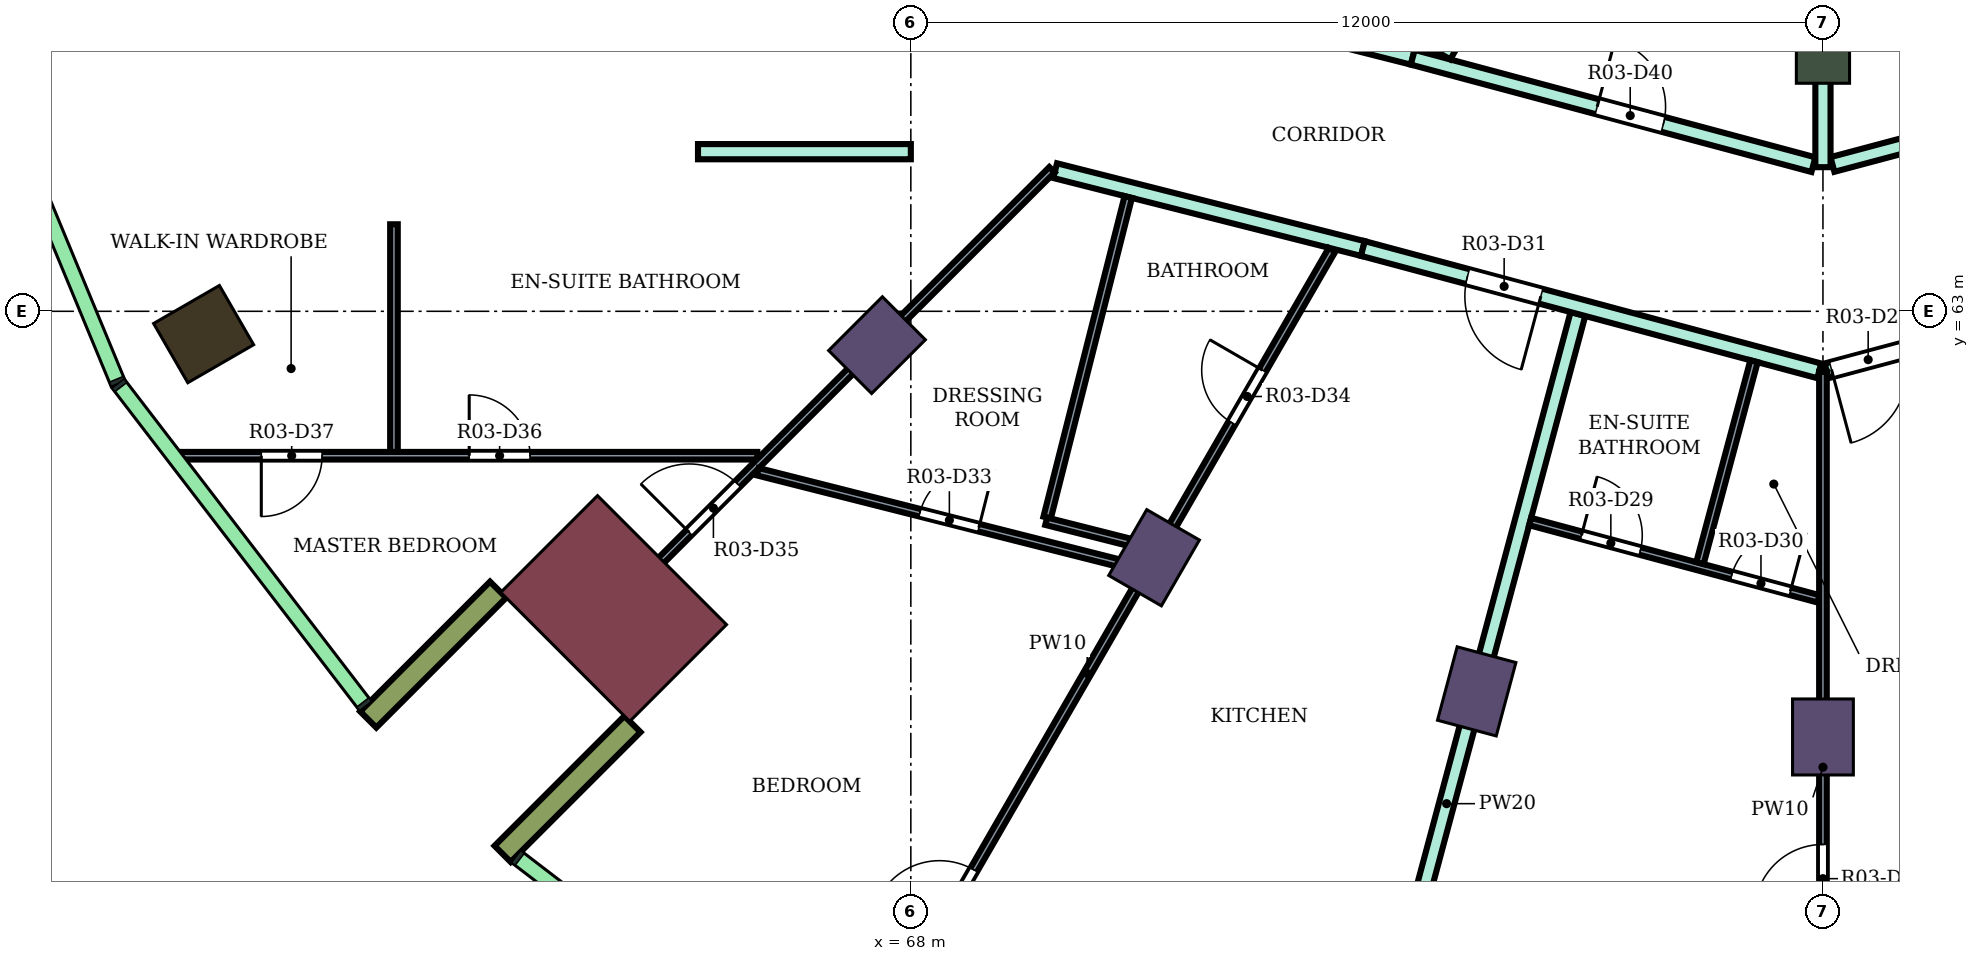
"""IFC4 building model, lengths in metres.
Left out: names, types, materials, properties, quantities, classifications, styles, units other than length and angle.
Written with IfcOpenShell. Run it as: python <this file> out.ifc"""

import sys

from ifc_helpers import new_model, si_unit, direction, frame, frame_2d, origin, origin_2d, place, context, subcontext, project, spatial, rectangle, extrude, element, fill, save


model = new_model("IFC4")
c1 = context("Model", 3, precision=1e-05, world=origin(), true_north=direction((0.0, 1.0)))
c2 = subcontext(c1, "Body", "Model", "MODEL_VIEW")
j1 = project(units=[si_unit("LENGTHUNIT", "METRE"), si_unit("PLANEANGLEUNIT", "RADIAN")], contexts=[c1])
p1 = place(None, origin())
s1 = spatial("IfcSite", under=j1, at=p1, CompositionType="ELEMENT")
p2 = place(p1, origin())
s2 = spatial("IfcBuilding", under=s1, at=p2, CompositionType="ELEMENT")
p3 = place(p2, frame((0.0, 0.0, 186.4)))
s3 = spatial("IfcBuildingStorey", under=s2, at=p3, CompositionType="ELEMENT", Elevation=186.4)
p4 = place(p3, frame((58.696, 62.7, 0.0), z_axis=(0.0, 0.0, 1.0), x_axis=(-0.866025403784, -0.5, 0.0)))
e1 = element("IfcColumn", 1, at=p4, inside=s3, PredefinedType="COLUMN", context=c2, shape_type="SweptSolid", body=[
    extrude(rectangle(XDim=1.0, YDim=0.9, at=origin_2d()), origin(), (0.0, 0.0, 1.0), 4.1),
])
for number, where, z_axis, x_axis in (
    (2, (67.555, 62.555, 0.0), (0.0, 0.0, 1.0), (-0.707, -0.707, 0.0)),
    (3, (71.2, 59.758, 0.0), (0.0, 0.0, 1.0), (-0.5, -0.866, 0.0)),
    (4, (75.445, 58.0, 0.0), (0.0, 0.0, 1.0), (-0.259, -0.966, 0.0)),
    (5, (80.0, 57.4, 0.0), (0.0, 0.0, 1.0), (0.0, -1.0, 0.0)),
):
    element("IfcColumn", number, at=place(p3, frame(where, z_axis=z_axis, x_axis=x_axis)), inside=s3, PredefinedType="COLUMN", context=c2, shape_type="SweptSolid", body=[
        extrude(rectangle(XDim=1.0, YDim=0.8, at=origin_2d()), origin(), (0.0, 0.0, 1.0), 4.1),
    ])
p5 = place(p3, frame((80.0, 66.4, 0.0), z_axis=(0.0, 0.0, 1.0), x_axis=(0.0, -1.0, 0.0)))
e6 = element("IfcColumn", 6, at=p5, inside=s3, PredefinedType="COLUMN", context=c2, shape_type="SweptSolid", body=[
    extrude(rectangle(XDim=0.8, YDim=0.7, at=origin_2d()), origin(), (0.0, 0.0, 1.0), 4.1),
])
p6 = place(p3, frame((64.09, 59.09, 0.0), z_axis=(0.0, 0.0, 1.0), x_axis=(-0.707106781187, -0.707106781187, 0.0)))
e7 = element("IfcColumn", 7, at=p6, inside=s3, PredefinedType="COLUMN", context=c2, shape_type="SweptSolid", body=[
    extrude(rectangle(XDim=1.8, YDim=2.4, at=origin_2d()), origin(), (0.0, 0.0, 1.0), 4.1),
])
for number, where, z_axis, x_axis in (
    (8, (62.57, 59.338, 0.0), (0.0, 0.0, 1.0), (-0.707, -0.707, 0.0)),
    (9, (64.338, 57.57, 0.0), (0.0, 0.0, 1.0), (-0.707, -0.707, 0.0)),
):
    element("IfcWall", number, at=place(p3, frame(where, z_axis=z_axis, x_axis=x_axis)), inside=s3, PredefinedType="NOTDEFINED", context=c2, shape_type="SweptSolid", body=[
        extrude(rectangle(XDim=2.416, YDim=0.3, at=frame_2d((1.208, 0.0))), origin(), (0.0, 0.0, 1.0), 4.1),
    ])
p7 = place(p3, frame((65.2, 65.1, 0.0), z_axis=(0.0, 0.0, 1.0), x_axis=(1.0, 0.0, 0.0)))
e10 = element("IfcWall", 10, at=p7, inside=s3, PredefinedType="PARTITIONING", context=c2, shape_type="SweptSolid", body=[
    extrude(rectangle(XDim=2.8, YDim=0.2, at=frame_2d((1.4, 0.0))), origin(), (0.0, 0.0, 1.0), 3.65),
])
p8 = place(p3, frame((69.899, 64.85, 0.0), z_axis=(0.0, 0.0, 1.0), x_axis=(0.969429930153, -0.245368316057, 0.0)))
e11 = element("IfcWall", 11, at=p8, inside=s3, PredefinedType="PARTITIONING", context=c2, shape_type="SweptSolid", body=[
    extrude(rectangle(XDim=4.176, YDim=0.2, at=frame_2d((2.088, 0.0))), origin(), (0.0, 0.0, 1.0), 3.65),
])
p9 = place(p3, frame((72.1, 66.975, 0.0), z_axis=(0.0, 0.0, 1.0), x_axis=(0.969471314457, -0.245204752086, 0.0)))
e12 = element("IfcWall", 12, at=p9, inside=s3, PredefinedType="PARTITIONING", context=c2, shape_type="SweptSolid", body=[
    extrude(rectangle(XDim=2.582, YDim=0.2, at=frame_2d((1.291, 0.0))), origin(), (0.0, 0.0, 1.0), 3.65),
])
p10 = place(p9, frame((0.841, 0.0, 0.0)))
e13 = element("IfcOpeningElement", 13, at=p10, cuts=e12, PredefinedType="OPENING", context=c2, shape_type="SweptSolid", body=[
    extrude(rectangle(XDim=0.9, YDim=2.1, at=frame_2d((0.45, 1.05))), frame((0.0, 0.11, 0.0), z_axis=(0.0, -1.0, 0.0), x_axis=(1.0, 0.0, 0.0)), (0.0, 0.0, 1.0), 0.22),
])
p11 = place(p3, frame((73.322, 50.081, 0.0), z_axis=(0.0, 0.0, 1.0), x_axis=(0.258965725415, 0.965886511481, 0.0)))
e14 = element("IfcWall", 14, at=p11, inside=s3, PredefinedType="PARTITIONING", context=c2, shape_type="SweptSolid", body=[
    extrude(rectangle(XDim=13.338, YDim=0.2, at=frame_2d((6.669, 0.0))), origin(), (0.0, 0.0, 1.0), 3.65),
])
p12 = place(p3, frame((73.947, 63.826, 0.0), z_axis=(0.0, 0.0, 1.0), x_axis=(0.965898432367, -0.258921258979, 0.0)))
e15 = element("IfcWall", 15, at=p12, inside=s3, PredefinedType="PARTITIONING", context=c2, shape_type="SweptSolid", body=[
    extrude(rectangle(XDim=6.217, YDim=0.2, at=frame_2d((3.108, 0.0))), origin(), (0.0, 0.0, 1.0), 3.65),
])
p13 = place(p12, frame((1.424, 0.0, 0.0)))
e16 = element("IfcOpeningElement", 16, at=p13, cuts=e15, PredefinedType="OPENING", context=c2, shape_type="SweptSolid", body=[
    extrude(rectangle(XDim=1.0, YDim=2.1, at=frame_2d((0.5, 1.05))), frame((0.0, 0.11, 0.0), z_axis=(0.0, -1.0, 0.0), x_axis=(1.0, 0.0, 0.0)), (0.0, 0.0, 1.0), 0.22),
])
p14 = place(p3, frame((74.603, 66.342, 0.0), z_axis=(0.0, 0.0, 1.0), x_axis=(0.965920893652, -0.258837453254, 0.0)))
e17 = element("IfcWall", 17, at=p14, inside=s3, PredefinedType="PARTITIONING", context=c2, shape_type="SweptSolid", body=[
    extrude(rectangle(XDim=5.458, YDim=0.2, at=frame_2d((2.729, 0.0))), origin(), (0.0, 0.0, 1.0), 3.65),
])
p15 = place(p14, frame((2.512, 0.0, 0.0)))
e18 = element("IfcOpeningElement", 18, at=p15, cuts=e17, PredefinedType="OPENING", context=c2, shape_type="SweptSolid", body=[
    extrude(rectangle(XDim=0.9, YDim=2.1, at=frame_2d((0.45, 1.05))), frame((0.0, 0.11, 0.0), z_axis=(0.0, -1.0, 0.0), x_axis=(1.0, 0.0, 0.0)), (0.0, 0.0, 1.0), 0.22),
])
p16 = place(p3, frame((75.01, 66.364, 0.0), z_axis=(0.0, 0.0, 1.0), x_axis=(0.500097042406, 0.865969369075, 0.0)))
e19 = element("IfcWall", 19, at=p16, inside=s3, PredefinedType="PARTITIONING", context=c2, shape_type="SweptSolid", body=[
    extrude(rectangle(XDim=2.275, YDim=0.2, at=frame_2d((1.138, 0.0))), origin(), (0.0, 0.0, 1.0), 3.65),
])
p17 = place(p3, frame((80.125, 64.932, 0.0), z_axis=(0.0, 0.0, 1.0), x_axis=(0.966236955806, 0.257655089674, 0.0)))
e20 = element("IfcWall", 20, at=p17, inside=s3, PredefinedType="PARTITIONING", context=c2, shape_type="SweptSolid", body=[
    extrude(rectangle(XDim=8.039, YDim=0.2, at=frame_2d((4.02, 0.0))), origin(), (0.0, 0.0, 1.0), 3.65),
])
p18 = place(p17, frame((6.298, 0.0, 0.0)))
e21 = element("IfcOpeningElement", 21, at=p18, cuts=e20, PredefinedType="OPENING", context=c2, shape_type="SweptSolid", body=[
    extrude(rectangle(XDim=0.9, YDim=2.1, at=frame_2d((0.45, 1.05))), frame((0.0, 0.11, 0.0), z_axis=(0.0, -1.0, 0.0), x_axis=(1.0, 0.0, 0.0)), (0.0, 0.0, 1.0), 0.22),
])
p19 = place(p17, frame((2.045, 0.0, 0.0)))
e22 = element("IfcOpeningElement", 22, at=p19, cuts=e20, PredefinedType="OPENING", context=c2, shape_type="SweptSolid", body=[
    extrude(rectangle(XDim=0.9, YDim=2.1, at=frame_2d((0.45, 1.05))), frame((0.0, 0.11, 0.0), z_axis=(0.0, -1.0, 0.0), x_axis=(1.0, 0.0, 0.0)), (0.0, 0.0, 1.0), 0.22),
])
p20 = place(p3, frame((80.048, 62.217, 0.0), z_axis=(0.0, 0.0, 1.0), x_axis=(0.965967276872, 0.258664299841, 0.0)))
e23 = element("IfcWall", 23, at=p20, inside=s3, PredefinedType="PARTITIONING", context=c2, shape_type="SweptSolid", body=[
    extrude(rectangle(XDim=6.007, YDim=0.2, at=frame_2d((3.003, 0.0))), origin(), (0.0, 0.0, 1.0), 3.65),
])
p21 = place(p20, frame((0.066, 0.0, 0.0)))
e24 = element("IfcOpeningElement", 24, at=p21, cuts=e23, PredefinedType="OPENING", context=c2, shape_type="SweptSolid", body=[
    extrude(rectangle(XDim=1.0, YDim=2.1, at=frame_2d((0.5, 1.05))), frame((0.0, 0.11, 0.0), z_axis=(0.0, -1.0, 0.0), x_axis=(1.0, 0.0, 0.0)), (0.0, 0.0, 1.0), 0.22),
])
p22 = place(p3, frame((80.0, 64.896, 0.0), z_axis=(0.0, 0.0, 1.0), x_axis=(0.0, 1.0, 0.0)))
e25 = element("IfcWall", 25, at=p22, inside=s3, PredefinedType="PARTITIONING", context=c2, shape_type="SweptSolid", body=[
    extrude(rectangle(XDim=2.405, YDim=0.2, at=frame_2d((1.203, 0.0))), origin(), (0.0, 0.0, 1.0), 3.65),
])
p23 = place(p3, frame((58.379, 61.1, 0.0), z_axis=(0.0, 0.0, 1.0), x_axis=(1.0, 0.0, 0.0)))
e26 = element("IfcWall", 26, at=p23, inside=s3, PredefinedType="PARTITIONING", context=c2, shape_type="SweptSolid", body=[
    extrude(rectangle(XDim=7.601, YDim=0.1, at=frame_2d((3.801, 0.0))), origin(), (0.0, 0.0, 1.0), 3.65),
])
p24 = place(p23, frame((3.811, 0.0, 0.0)))
e27 = element("IfcOpeningElement", 27, at=p24, cuts=e26, PredefinedType="OPENING", context=c2, shape_type="SweptSolid", body=[
    extrude(rectangle(XDim=0.8, YDim=2.1, at=frame_2d((0.4, 1.05))), frame((0.0, 0.06, 0.0), z_axis=(0.0, -1.0, 0.0), x_axis=(1.0, 0.0, 0.0)), (0.0, 0.0, 1.0), 0.12),
])
p25 = place(p23, frame((1.075, 0.0, 0.0)))
e28 = element("IfcOpeningElement", 28, at=p25, cuts=e26, PredefinedType="OPENING", context=c2, shape_type="SweptSolid", body=[
    extrude(rectangle(XDim=0.8, YDim=2.1, at=frame_2d((0.4, 1.05))), frame((0.0, 0.06, 0.0), z_axis=(0.0, -1.0, 0.0), x_axis=(1.0, 0.0, 0.0)), (0.0, 0.0, 1.0), 0.12),
])
p26 = place(p3, frame((61.2, 61.15, 0.0), z_axis=(0.0, 0.0, 1.0), x_axis=(0.0, 1.0, 0.0)))
e29 = element("IfcWall", 29, at=p26, inside=s3, PredefinedType="PARTITIONING", context=c2, shape_type="SweptSolid", body=[
    extrude(rectangle(XDim=2.995, YDim=0.1, at=frame_2d((1.498, 0.0))), origin(), (0.0, 0.0, 1.0), 3.65),
])
p27 = place(p3, frame((63.592, 58.6, 0.0), z_axis=(0.0, 0.0, 1.0), x_axis=(0.707272108928, 0.706941414781, 0.0)))
e30 = element("IfcWall", 30, at=p27, inside=s3, PredefinedType="PARTITIONING", context=c2, shape_type="SweptSolid", body=[
    extrude(rectangle(XDim=8.859, YDim=0.1, at=frame_2d((4.43, 0.0))), origin(), (0.0, 0.0, 1.0), 3.65),
])
p28 = place(p27, frame((2.111, 0.0, 0.0)))
e31 = element("IfcOpeningElement", 31, at=p28, cuts=e30, PredefinedType="OPENING", context=c2, shape_type="SweptSolid", body=[
    extrude(rectangle(XDim=0.9, YDim=2.1, at=frame_2d((0.45, 1.05))), frame((0.0, 0.06, 0.0), z_axis=(0.0, -1.0, 0.0), x_axis=(1.0, 0.0, 0.0)), (0.0, 0.0, 1.0), 0.12),
])
p29 = place(p3, frame((65.987, 60.889, 0.0), z_axis=(0.0, 0.0, 1.0), x_axis=(0.969431303535, -0.245362889871, 0.0)))
e32 = element("IfcWall", 32, at=p29, inside=s3, PredefinedType="PARTITIONING", context=c2, shape_type="SweptSolid", body=[
    extrude(rectangle(XDim=5.22, YDim=0.1, at=frame_2d((2.61, 0.0))), origin(), (0.0, 0.0, 1.0), 3.65),
])
p30 = place(p29, frame((2.2, 0.0, 0.0)))
e33 = element("IfcOpeningElement", 33, at=p30, cuts=e32, PredefinedType="OPENING", context=c2, shape_type="SweptSolid", body=[
    extrude(rectangle(XDim=0.8, YDim=2.1, at=frame_2d((0.4, 1.05))), frame((0.0, 0.06, 0.0), z_axis=(0.0, -1.0, 0.0), x_axis=(1.0, 0.0, 0.0)), (0.0, 0.0, 1.0), 0.12),
])
p31 = place(p3, frame((67.099, 52.66, 0.0), z_axis=(0.0, 0.0, 1.0), x_axis=(0.500286442712, 0.865859962834, 0.0)))
e34 = element("IfcWall", 34, at=p31, inside=s3, PredefinedType="PARTITIONING", context=c2, shape_type="SweptSolid", body=[
    extrude(rectangle(XDim=12.876, YDim=0.1, at=frame_2d((6.438, 0.0))), origin(), (0.0, 0.0, 1.0), 3.65),
])
p32 = place(p31, frame((2.556, 0.0, 0.0)))
e35 = element("IfcOpeningElement", 35, at=p32, cuts=e34, PredefinedType="OPENING", context=c2, shape_type="SweptSolid", body=[
    extrude(rectangle(XDim=0.9, YDim=2.1, at=frame_2d((0.45, 1.05))), frame((0.0, 0.06, 0.0), z_axis=(0.0, -1.0, 0.0), x_axis=(1.0, 0.0, 0.0)), (0.0, 0.0, 1.0), 0.12),
])
p33 = place(p31, frame((10.248, 0.0, 0.0)))
e36 = element("IfcOpeningElement", 36, at=p33, cuts=e34, PredefinedType="OPENING", context=c2, shape_type="SweptSolid", body=[
    extrude(rectangle(XDim=0.8, YDim=2.1, at=frame_2d((0.4, 1.05))), frame((0.0, 0.06, 0.0), z_axis=(0.0, -1.0, 0.0), x_axis=(1.0, 0.0, 0.0)), (0.0, 0.0, 1.0), 0.12),
])
p34 = place(p3, frame((69.793, 60.287, 0.0), z_axis=(0.0, 0.0, 1.0), x_axis=(0.245307703654, 0.969445269486, 0.0)))
e37 = element("IfcWall", 37, at=p34, inside=s3, PredefinedType="PARTITIONING", context=c2, shape_type="SweptSolid", body=[
    extrude(rectangle(XDim=4.35, YDim=0.1, at=frame_2d((2.175, 0.0))), origin(), (0.0, 0.0, 1.0), 3.65),
])
p35 = place(p3, frame((69.781, 60.238, 0.0), z_axis=(0.0, 0.0, 1.0), x_axis=(0.969502558328, -0.245081189397, 0.0)))
e38 = element("IfcWall", 38, at=p35, inside=s3, PredefinedType="PARTITIONING", context=c2, shape_type="SweptSolid", body=[
    extrude(rectangle(XDim=1.466, YDim=0.1, at=frame_2d((0.733, 0.0))), origin(), (0.0, 0.0, 1.0), 3.65),
])
p36 = place(p3, frame((76.147, 60.234, 0.0), z_axis=(0.0, 0.0, 1.0), x_axis=(0.965925861199, -0.258818914816, 0.0)))
e39 = element("IfcWall", 39, at=p36, inside=s3, PredefinedType="PARTITIONING", context=c2, shape_type="SweptSolid", body=[
    extrude(rectangle(XDim=3.929, YDim=0.1, at=frame_2d((1.964, 0.0))), origin(), (0.0, 0.0, 1.0), 3.65),
])
p37 = place(p36, frame((0.7, 0.0, 0.0)))
e40 = element("IfcOpeningElement", 40, at=p37, cuts=e39, PredefinedType="OPENING", context=c2, shape_type="SweptSolid", body=[
    extrude(rectangle(XDim=0.8, YDim=2.1, at=frame_2d((0.4, 1.05))), frame((0.0, 0.06, 0.0), z_axis=(0.0, -1.0, 0.0), x_axis=(1.0, 0.0, 0.0)), (0.0, 0.0, 1.0), 0.12),
])
p38 = place(p36, frame((2.745, 0.0, 0.0)))
e41 = element("IfcOpeningElement", 41, at=p38, cuts=e39, PredefinedType="OPENING", context=c2, shape_type="SweptSolid", body=[
    extrude(rectangle(XDim=0.8, YDim=2.1, at=frame_2d((0.4, 1.05))), frame((0.0, 0.06, 0.0), z_axis=(0.0, -1.0, 0.0), x_axis=(1.0, 0.0, 0.0)), (0.0, 0.0, 1.0), 0.12),
])
p39 = place(p3, frame((78.382, 59.687, 0.0), z_axis=(0.0, 0.0, 1.0), x_axis=(0.258629573817, 0.965976575051, 0.0)))
e42 = element("IfcWall", 42, at=p39, inside=s3, PredefinedType="PARTITIONING", context=c2, shape_type="SweptSolid", body=[
    extrude(rectangle(XDim=2.75, YDim=0.1, at=frame_2d((1.375, 0.0))), origin(), (0.0, 0.0, 1.0), 3.65),
])
p40 = place(p3, frame((80.0, 51.8, 0.0), z_axis=(0.0, 0.0, 1.0), x_axis=(0.0, 1.0, 0.0)))
e43 = element("IfcWall", 43, at=p40, inside=s3, PredefinedType="PARTITIONING", context=c2, shape_type="SweptSolid", body=[
    extrude(rectangle(XDim=10.404, YDim=0.1, at=frame_2d((5.202, 0.0))), origin(), (0.0, 0.0, 1.0), 3.65),
])
p41 = place(p40, frame((3.286, 0.0, 0.0)))
e44 = element("IfcOpeningElement", 44, at=p41, cuts=e43, PredefinedType="OPENING", context=c2, shape_type="SweptSolid", body=[
    extrude(rectangle(XDim=0.9, YDim=2.1, at=frame_2d((0.45, 1.05))), frame((0.0, 0.06, 0.0), z_axis=(0.0, -1.0, 0.0), x_axis=(1.0, 0.0, 0.0)), (0.0, 0.0, 1.0), 0.12),
])
p42 = place(p21, frame((1.0, 0.0, 0.0), z_axis=(0.0, 0.0, 1.0), x_axis=(-1.0, 0.0, 0.0)))
e45 = element("IfcDoor", 45, at=p42, inside=s3, OperationType="SINGLE_SWING_RIGHT", PredefinedType="DOOR", context=c2, shape_type="SweptSolid", body=[
    extrude(rectangle(XDim=1.0, YDim=2.1, at=frame_2d((0.5, 1.05))), frame((0.0, 0.025, 0.0), z_axis=(0.0, -1.0, 0.0), x_axis=(1.0, 0.0, 0.0)), (0.0, 0.0, 1.0), 0.05),
])
fill(e24, e45)
p43 = place(p41, origin())
e46 = element("IfcDoor", 46, at=p43, inside=s3, OperationType="SINGLE_SWING_LEFT", PredefinedType="DOOR", context=c2, shape_type="SweptSolid", body=[
    extrude(rectangle(XDim=0.9, YDim=2.1, at=frame_2d((0.45, 1.05))), frame((0.0, 0.025, 0.0), z_axis=(0.0, -1.0, 0.0), x_axis=(1.0, 0.0, 0.0)), (0.0, 0.0, 1.0), 0.05),
])
fill(e44, e46)
p44 = place(p37, origin())
e47 = element("IfcDoor", 47, at=p44, inside=s3, OperationType="SINGLE_SWING_LEFT", PredefinedType="DOOR", context=c2, shape_type="SweptSolid", body=[
    extrude(rectangle(XDim=0.8, YDim=2.1, at=frame_2d((0.4, 1.05))), frame((0.0, 0.025, 0.0), z_axis=(0.0, -1.0, 0.0), x_axis=(1.0, 0.0, 0.0)), (0.0, 0.0, 1.0), 0.05),
])
fill(e40, e47)
p45 = place(p38, origin())
e48 = element("IfcDoor", 48, at=p45, inside=s3, OperationType="SINGLE_SWING_RIGHT", PredefinedType="DOOR", context=c2, shape_type="SweptSolid", body=[
    extrude(rectangle(XDim=0.8, YDim=2.1, at=frame_2d((0.4, 1.05))), frame((0.0, 0.025, 0.0), z_axis=(0.0, -1.0, 0.0), x_axis=(1.0, 0.0, 0.0)), (0.0, 0.0, 1.0), 0.05),
])
fill(e41, e48)
p46 = place(p13, frame((1.0, 0.0, 0.0), z_axis=(0.0, 0.0, 1.0), x_axis=(-1.0, 0.0, 0.0)))
e49 = element("IfcDoor", 49, at=p46, inside=s3, OperationType="SINGLE_SWING_LEFT", PredefinedType="DOOR", context=c2, shape_type="SweptSolid", body=[
    extrude(rectangle(XDim=1.0, YDim=2.1, at=frame_2d((0.5, 1.05))), frame((0.0, 0.025, 0.0), z_axis=(0.0, -1.0, 0.0), x_axis=(1.0, 0.0, 0.0)), (0.0, 0.0, 1.0), 0.05),
])
fill(e16, e49)
p47 = place(p32, origin())
e50 = element("IfcDoor", 50, at=p47, inside=s3, OperationType="SINGLE_SWING_LEFT", PredefinedType="DOOR", context=c2, shape_type="SweptSolid", body=[
    extrude(rectangle(XDim=0.9, YDim=2.1, at=frame_2d((0.45, 1.05))), frame((0.0, 0.025, 0.0), z_axis=(0.0, -1.0, 0.0), x_axis=(1.0, 0.0, 0.0)), (0.0, 0.0, 1.0), 0.05),
])
fill(e35, e50)
p48 = place(p30, origin())
e51 = element("IfcDoor", 51, at=p48, inside=s3, OperationType="SINGLE_SWING_RIGHT", PredefinedType="DOOR", context=c2, shape_type="SweptSolid", body=[
    extrude(rectangle(XDim=0.8, YDim=2.1, at=frame_2d((0.4, 1.05))), frame((0.0, 0.025, 0.0), z_axis=(0.0, -1.0, 0.0), x_axis=(1.0, 0.0, 0.0)), (0.0, 0.0, 1.0), 0.05),
])
fill(e33, e51)
p49 = place(p33, origin())
e52 = element("IfcDoor", 52, at=p49, inside=s3, OperationType="SINGLE_SWING_RIGHT", PredefinedType="DOOR", context=c2, shape_type="SweptSolid", body=[
    extrude(rectangle(XDim=0.8, YDim=2.1, at=frame_2d((0.4, 1.05))), frame((0.0, 0.025, 0.0), z_axis=(0.0, -1.0, 0.0), x_axis=(1.0, 0.0, 0.0)), (0.0, 0.0, 1.0), 0.05),
])
fill(e36, e52)
p50 = place(p28, origin())
e53 = element("IfcDoor", 53, at=p50, inside=s3, OperationType="SINGLE_SWING_LEFT", PredefinedType="DOOR", context=c2, shape_type="SweptSolid", body=[
    extrude(rectangle(XDim=0.9, YDim=2.1, at=frame_2d((0.45, 1.05))), frame((0.0, 0.025, 0.0), z_axis=(0.0, -1.0, 0.0), x_axis=(1.0, 0.0, 0.0)), (0.0, 0.0, 1.0), 0.05),
])
fill(e31, e53)
p51 = place(p24, origin())
e54 = element("IfcDoor", 54, at=p51, inside=s3, OperationType="SINGLE_SWING_LEFT", PredefinedType="DOOR", context=c2, shape_type="SweptSolid", body=[
    extrude(rectangle(XDim=0.8, YDim=2.1, at=frame_2d((0.4, 1.05))), frame((0.0, 0.025, 0.0), z_axis=(0.0, -1.0, 0.0), x_axis=(1.0, 0.0, 0.0)), (0.0, 0.0, 1.0), 0.05),
])
fill(e27, e54)
p52 = place(p25, frame((0.8, 0.0, 0.0), z_axis=(0.0, 0.0, 1.0), x_axis=(-1.0, 0.0, 0.0)))
e55 = element("IfcDoor", 55, at=p52, inside=s3, OperationType="SINGLE_SWING_RIGHT", PredefinedType="DOOR", context=c2, shape_type="SweptSolid", body=[
    extrude(rectangle(XDim=0.8, YDim=2.1, at=frame_2d((0.4, 1.05))), frame((0.0, 0.025, 0.0), z_axis=(0.0, -1.0, 0.0), x_axis=(1.0, 0.0, 0.0)), (0.0, 0.0, 1.0), 0.05),
])
fill(e28, e55)
p53 = place(p15, origin())
e56 = element("IfcDoor", 56, at=p53, inside=s3, OperationType="SINGLE_SWING_LEFT", PredefinedType="DOOR", context=c2, shape_type="SweptSolid", body=[
    extrude(rectangle(XDim=0.9, YDim=2.1, at=frame_2d((0.45, 1.05))), frame((0.0, 0.025, 0.0), z_axis=(0.0, -1.0, 0.0), x_axis=(1.0, 0.0, 0.0)), (0.0, 0.0, 1.0), 0.05),
])
fill(e18, e56)
save(model, sys.argv[1])
